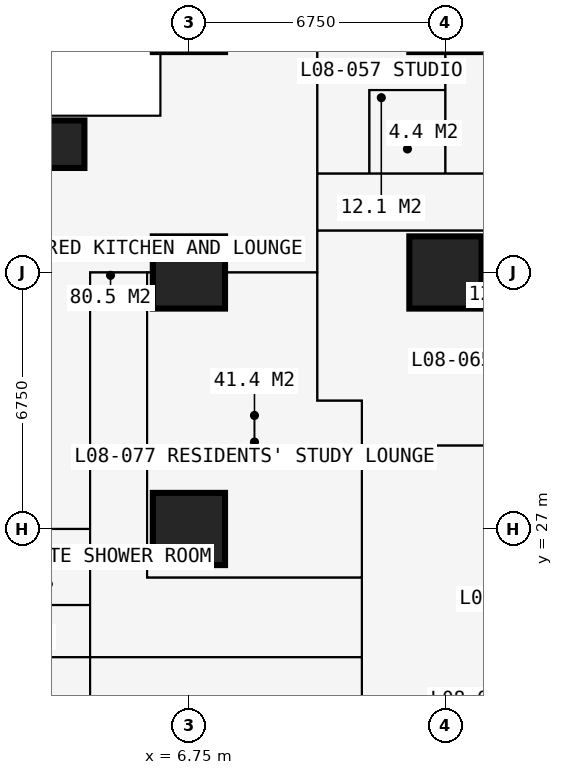
"""IFC4 building model, lengths in metres.
Left out: names, types, materials, properties, quantities, classifications, styles, units other than length and angle.
Written with IfcOpenShell. Run it as: python <this file> out.ifc"""

import sys

from ifc_helpers import new_model, si_unit, direction, frame, frame_2d, origin, origin_2d, place, context, subcontext, project, spatial, rectangle, extrude, element, fill, save


model = new_model("IFC4")
c1 = context("Model", 3, precision=1e-05, world=origin(), true_north=direction((0.0, 1.0)))
c2 = subcontext(c1, "Body", "Model", "MODEL_VIEW")
j1 = project(units=[si_unit("LENGTHUNIT", "METRE"), si_unit("PLANEANGLEUNIT", "RADIAN")], contexts=[c1])
p1 = place(None, origin())
s1 = spatial("IfcSite", under=j1, at=p1, CompositionType="ELEMENT")
p2 = place(p1, origin())
s2 = spatial("IfcBuilding", under=s1, at=p2, CompositionType="ELEMENT")
p3 = place(p2, frame((0.0, 0.0, 32.4)))
s3 = spatial("IfcBuildingStorey", under=s2, at=p3, CompositionType="ELEMENT", Elevation=32.4)
p4 = place(p3, frame((3.375, 37.125, 0.0), z_axis=(0.0, 0.0, 1.0), x_axis=(1.0, 0.0, 0.0)))
e1 = element("IfcColumn", 1, at=p4, inside=s3, PredefinedType="COLUMN", context=c2, shape_type="SweptSolid", body=[
    extrude(rectangle(XDim=1.25, YDim=1.25, at=origin_2d()), origin(), (0.0, 0.0, 1.0), 3.6),
])
for number, where, z_axis, x_axis in (
    (2, (6.75, 27.0, 0.0), (0.0, 0.0, 1.0), (1.0, 0.0, 0.0)),
    (3, (6.75, 33.75, 0.0), (0.0, 0.0, 1.0), (1.0, 0.0, 0.0)),
    (4, (13.5, 33.75, 0.0), (0.0, 0.0, 1.0), (1.0, 0.0, 0.0)),
):
    element("IfcColumn", number, at=place(p3, frame(where, z_axis=z_axis, x_axis=x_axis)), inside=s3, PredefinedType="COLUMN", context=c2, shape_type="SweptSolid", body=[
        extrude(rectangle(XDim=1.9, YDim=1.9, at=origin_2d()), origin(), (0.0, 0.0, 1.0), 3.6),
    ])
p5 = place(p3, frame((27.6, 27.0, 0.0), z_axis=(0.0, 0.0, 1.0), x_axis=(-1.0, 0.0, 0.0)))
e5 = element("IfcWall", 5, at=p5, inside=s3, PredefinedType="SHEAR", context=c2, shape_type="SweptSolid", body=[
    extrude(rectangle(XDim=14.7, YDim=1.2, at=frame_2d((7.35, 0.0))), origin(), (0.0, 0.0, 1.0), 3.6),
])
p6 = place(p5, frame((5.225, 0.0, 0.0)))
e6 = element("IfcOpeningElement", 6, at=p6, cuts=e5, PredefinedType="OPENING", context=c2, shape_type="SweptSolid", body=[
    extrude(rectangle(XDim=0.9, YDim=2.2, at=frame_2d((0.45, 1.1))), frame((0.0, 0.61, 0.0), z_axis=(0.0, -1.0, 0.0), x_axis=(1.0, 0.0, 0.0)), (0.0, 0.0, 1.0), 1.22),
])
p7 = place(p5, frame((8.2, 0.0, 0.0)))
e7 = element("IfcOpeningElement", 7, at=p7, cuts=e5, PredefinedType="OPENING", context=c2, shape_type="SweptSolid", body=[
    extrude(rectangle(XDim=1.0, YDim=2.2, at=frame_2d((0.5, 1.1))), frame((0.0, 0.61, 0.0), z_axis=(0.0, -1.0, 0.0), x_axis=(1.0, 0.0, 0.0)), (0.0, 0.0, 1.0), 1.22),
])
p8 = place(p3, frame((13.5, 26.4, 0.0), z_axis=(0.0, 0.0, 1.0), x_axis=(0.0, -1.0, 0.0)))
e8 = element("IfcWall", 8, at=p8, inside=s3, PredefinedType="SHEAR", context=c2, shape_type="SweptSolid", body=[
    extrude(rectangle(XDim=12.3, YDim=1.2, at=frame_2d((6.15, 0.0))), origin(), (0.0, 0.0, 1.0), 3.6),
])
p9 = place(p8, frame((7.45, 0.0, 0.0)))
e9 = element("IfcOpeningElement", 9, at=p9, cuts=e8, PredefinedType="OPENING", context=c2, shape_type="SweptSolid", body=[
    extrude(rectangle(XDim=1.2, YDim=2.2, at=frame_2d((0.6, 1.1))), frame((0.0, 0.61, 0.0), z_axis=(0.0, -1.0, 0.0), x_axis=(1.0, 0.0, 0.0)), (0.0, 0.0, 1.0), 1.22),
])
p10 = place(p3, frame((6.0, 41.25, 0.0), z_axis=(0.0, 0.0, 1.0), x_axis=(0.0, -1.0, 0.0)))
e10 = element("IfcWall", 10, at=p10, inside=s3, PredefinedType="SOLIDWALL", context=c2, shape_type="SweptSolid", body=[
    extrude(rectangle(XDim=3.375, YDim=0.3, at=frame_2d((1.688, 0.0))), origin(), (0.0, 0.0, 1.0), 3.375),
])
p11 = place(p10, frame((1.857, 0.0, 0.9)))
e11 = element("IfcOpeningElement", 11, at=p11, cuts=e10, PredefinedType="OPENING", context=c2, shape_type="SweptSolid", body=[
    extrude(rectangle(XDim=1.2, YDim=1.8, at=frame_2d((0.6, 0.9))), frame((0.0, 0.16, 0.0), z_axis=(0.0, -1.0, 0.0), x_axis=(1.0, 0.0, 0.0)), (0.0, 0.0, 1.0), 0.32),
])
p12 = place(p3, frame((6.0, 37.875, 0.0), z_axis=(0.0, 0.0, 1.0), x_axis=(-1.0, 0.0, 0.0)))
e12 = element("IfcWall", 12, at=p12, inside=s3, PredefinedType="SOLIDWALL", context=c2, shape_type="SweptSolid", body=[
    extrude(rectangle(XDim=3.375, YDim=0.3, at=frame_2d((1.688, 0.0))), origin(), (0.0, 0.0, 1.0), 3.375),
])
p13 = place(p12, frame((0.788, 0.0, 0.6)))
e13 = element("IfcOpeningElement", 13, at=p13, cuts=e12, PredefinedType="OPENING", context=c2, shape_type="SweptSolid", body=[
    extrude(rectangle(XDim=1.8, YDim=2.1, at=frame_2d((0.9, 1.05))), frame((0.0, 0.16, 0.0), z_axis=(0.0, -1.0, 0.0), x_axis=(1.0, 0.0, 0.0)), (0.0, 0.0, 1.0), 0.32),
])
p14 = place(p3, frame((-0.734, 23.625, 0.0), z_axis=(0.0, 0.0, 1.0), x_axis=(1.0, 0.0, 0.0)))
e14 = element("IfcWall", 14, at=p14, inside=s3, PredefinedType="PARTITIONING", context=c2, shape_type="SweptSolid", body=[
    extrude(rectangle(XDim=12.034, YDim=0.15, at=frame_2d((6.017, 0.0))), origin(), (0.0, 0.0, 1.0), 3.375),
])
p15 = place(p3, frame((-0.734, 27.0, 0.0), z_axis=(0.0, 0.0, 1.0), x_axis=(1.0, 0.0, 0.0)))
e15 = element("IfcWall", 15, at=p15, inside=s3, PredefinedType="PARTITIONING", context=c2, shape_type="SweptSolid", body=[
    extrude(rectangle(XDim=4.884, YDim=0.15, at=frame_2d((2.442, 0.0))), origin(), (0.0, 0.0, 1.0), 2.61),
])
p16 = place(p3, frame((1.95, 25.0, 0.0), z_axis=(0.0, 0.0, 1.0), x_axis=(1.0, 0.0, 0.0)))
e16 = element("IfcWall", 16, at=p16, inside=s3, PredefinedType="PARTITIONING", context=c2, shape_type="SweptSolid", body=[
    extrude(rectangle(XDim=2.2, YDim=0.1, at=frame_2d((1.1, 0.0))), origin(), (0.0, 0.0, 1.0), 3.375),
])
p17 = place(p16, frame((0.65, 0.0, 0.0)))
e17 = element("IfcOpeningElement", 17, at=p17, cuts=e16, PredefinedType="OPENING", context=c2, shape_type="SweptSolid", body=[
    extrude(rectangle(XDim=0.9, YDim=2.2, at=frame_2d((0.45, 1.1))), frame((0.0, 0.06, 0.0), z_axis=(0.0, -1.0, 0.0), x_axis=(1.0, 0.0, 0.0)), (0.0, 0.0, 1.0), 0.12),
])
p18 = place(p3, frame((4.15, 10.125, 0.0), z_axis=(0.0, 0.0, 1.0), x_axis=(0.0, 1.0, 0.0)))
e18 = element("IfcWall", 18, at=p18, inside=s3, PredefinedType="PARTITIONING", context=c2, shape_type="SweptSolid", body=[
    extrude(rectangle(XDim=23.625, YDim=0.15, at=frame_2d((11.812, 0.0))), origin(), (0.0, 0.0, 1.0), 3.375),
])
p19 = place(p18, frame((19.775, 0.0, 0.0)))
e19 = element("IfcOpeningElement", 19, at=p19, cuts=e18, PredefinedType="OPENING", context=c2, shape_type="SweptSolid", body=[
    extrude(rectangle(XDim=1.0, YDim=2.2, at=frame_2d((0.5, 1.1))), frame((0.0, 0.085, 0.0), z_axis=(0.0, -1.0, 0.0), x_axis=(1.0, 0.0, 0.0)), (0.0, 0.0, 1.0), 0.17),
])
p20 = place(p18, frame((13.7, 0.0, 0.0)))
e20 = element("IfcOpeningElement", 20, at=p20, cuts=e18, PredefinedType="OPENING", context=c2, shape_type="SweptSolid", body=[
    extrude(rectangle(XDim=0.95, YDim=2.2, at=frame_2d((0.475, 1.1))), frame((0.0, 0.085, 0.0), z_axis=(0.0, -1.0, 0.0), x_axis=(1.0, 0.0, 0.0)), (0.0, 0.0, 1.0), 0.17),
])
p21 = place(p18, frame((4.2, 0.0, 0.0)))
e21 = element("IfcOpeningElement", 21, at=p21, cuts=e18, PredefinedType="OPENING", context=c2, shape_type="SweptSolid", body=[
    extrude(rectangle(XDim=0.95, YDim=2.2, at=frame_2d((0.475, 1.1))), frame((0.0, 0.085, 0.0), z_axis=(0.0, -1.0, 0.0), x_axis=(1.0, 0.0, 0.0)), (0.0, 0.0, 1.0), 0.17),
])
p22 = place(p18, frame((10.95, 0.0, 0.0)))
e22 = element("IfcOpeningElement", 22, at=p22, cuts=e18, PredefinedType="OPENING", context=c2, shape_type="SweptSolid", body=[
    extrude(rectangle(XDim=0.95, YDim=2.2, at=frame_2d((0.475, 1.1))), frame((0.0, 0.085, 0.0), z_axis=(0.0, -1.0, 0.0), x_axis=(1.0, 0.0, 0.0)), (0.0, 0.0, 1.0), 0.17),
])
p23 = place(p3, frame((4.15, 33.75, 0.0), z_axis=(0.0, 0.0, 1.0), x_axis=(1.0, 0.0, 0.0)))
e23 = element("IfcWall", 23, at=p23, inside=s3, PredefinedType="PARTITIONING", context=c2, shape_type="SweptSolid", body=[
    extrude(rectangle(XDim=5.975, YDim=0.15, at=frame_2d((2.988, 0.0))), origin(), (0.0, 0.0, 1.0), 2.877),
])
p24 = place(p3, frame((5.65, 25.725, 0.0), z_axis=(0.0, 0.0, 1.0), x_axis=(0.0, 1.0, 0.0)))
e24 = element("IfcWall", 24, at=p24, inside=s3, PredefinedType="PARTITIONING", context=c2, shape_type="SweptSolid", body=[
    extrude(rectangle(XDim=8.025, YDim=0.15, at=frame_2d((4.012, 0.0))), origin(), (0.0, 0.0, 1.0), 3.375),
])
p25 = place(p3, frame((5.65, 25.725, 0.0), z_axis=(0.0, 0.0, 1.0), x_axis=(1.0, 0.0, 0.0)))
e25 = element("IfcWall", 25, at=p25, inside=s3, PredefinedType="PARTITIONING", context=c2, shape_type="SweptSolid", body=[
    extrude(rectangle(XDim=5.65, YDim=0.15, at=frame_2d((2.825, 0.0))), origin(), (0.0, 0.0, 1.0), 3.375),
])
p26 = place(p3, frame((10.125, 30.375, 0.0), z_axis=(0.0, 0.0, 1.0), x_axis=(0.0, 1.0, 0.0)))
e26 = element("IfcWall", 26, at=p26, inside=s3, PredefinedType="PARTITIONING", context=c2, shape_type="SweptSolid", body=[
    extrude(rectangle(XDim=10.859, YDim=0.15, at=frame_2d((5.429, 0.0))), origin(), (0.0, 0.0, 1.0), 3.375),
])
p27 = place(p3, frame((10.125, 30.375, 0.0), z_axis=(0.0, 0.0, 1.0), x_axis=(1.0, 0.0, 0.0)))
e27 = element("IfcWall", 27, at=p27, inside=s3, PredefinedType="PARTITIONING", context=c2, shape_type="SweptSolid", body=[
    extrude(rectangle(XDim=1.175, YDim=0.15, at=frame_2d((0.587, 0.0))), origin(), (0.0, 0.0, 1.0), 3.375),
])
p28 = place(p3, frame((10.125, 34.85, 0.0), z_axis=(0.0, 0.0, 1.0), x_axis=(1.0, 0.0, 0.0)))
e28 = element("IfcWall", 28, at=p28, inside=s3, PredefinedType="PARTITIONING", context=c2, shape_type="SweptSolid", body=[
    extrude(rectangle(XDim=10.762, YDim=0.15, at=frame_2d((5.381, 0.0))), origin(), (0.0, 0.0, 1.0), 3.375),
])
p29 = place(p28, frame((4.9, 0.0, 0.0)))
e29 = element("IfcOpeningElement", 29, at=p29, cuts=e28, PredefinedType="OPENING", context=c2, shape_type="SweptSolid", body=[
    extrude(rectangle(XDim=0.95, YDim=2.2, at=frame_2d((0.475, 1.1))), frame((0.0, 0.085, 0.0), z_axis=(0.0, -1.0, 0.0), x_axis=(1.0, 0.0, 0.0)), (0.0, 0.0, 1.0), 0.17),
])
p30 = place(p3, frame((10.125, 36.35, 0.0), z_axis=(0.0, 0.0, 1.0), x_axis=(1.0, 0.0, 0.0)))
e30 = element("IfcWall", 30, at=p30, inside=s3, PredefinedType="PARTITIONING", context=c2, shape_type="SweptSolid", body=[
    extrude(rectangle(XDim=23.625, YDim=0.1, at=frame_2d((11.812, 0.0))), origin(), (0.0, 0.0, 1.0), 3.375),
])
p31 = place(p30, frame((20.5, 0.0, 0.0)))
e31 = element("IfcOpeningElement", 31, at=p31, cuts=e30, PredefinedType="OPENING", context=c2, shape_type="SweptSolid", body=[
    extrude(rectangle(XDim=0.95, YDim=2.2, at=frame_2d((0.475, 1.1))), frame((0.0, 0.06, 0.0), z_axis=(0.0, -1.0, 0.0), x_axis=(1.0, 0.0, 0.0)), (0.0, 0.0, 1.0), 0.12),
])
p32 = place(p30, frame((17.125, 0.0, 0.0)))
e32 = element("IfcOpeningElement", 32, at=p32, cuts=e30, PredefinedType="OPENING", context=c2, shape_type="SweptSolid", body=[
    extrude(rectangle(XDim=0.95, YDim=2.2, at=frame_2d((0.475, 1.1))), frame((0.0, 0.06, 0.0), z_axis=(0.0, -1.0, 0.0), x_axis=(1.0, 0.0, 0.0)), (0.0, 0.0, 1.0), 0.12),
])
p33 = place(p30, frame((13.7, 0.0, 0.0)))
e33 = element("IfcOpeningElement", 33, at=p33, cuts=e30, PredefinedType="OPENING", context=c2, shape_type="SweptSolid", body=[
    extrude(rectangle(XDim=0.95, YDim=2.2, at=frame_2d((0.475, 1.1))), frame((0.0, 0.06, 0.0), z_axis=(0.0, -1.0, 0.0), x_axis=(1.0, 0.0, 0.0)), (0.0, 0.0, 1.0), 0.12),
])
p34 = place(p30, frame((0.2, 0.0, 0.0)))
e34 = element("IfcOpeningElement", 34, at=p34, cuts=e30, PredefinedType="OPENING", context=c2, shape_type="SweptSolid", body=[
    extrude(rectangle(XDim=0.95, YDim=2.2, at=frame_2d((0.475, 1.1))), frame((0.0, 0.06, 0.0), z_axis=(0.0, -1.0, 0.0), x_axis=(1.0, 0.0, 0.0)), (0.0, 0.0, 1.0), 0.12),
])
p35 = place(p30, frame((3.625, 0.0, 0.0)))
e35 = element("IfcOpeningElement", 35, at=p35, cuts=e30, PredefinedType="OPENING", context=c2, shape_type="SweptSolid", body=[
    extrude(rectangle(XDim=0.95, YDim=2.2, at=frame_2d((0.475, 1.1))), frame((0.0, 0.06, 0.0), z_axis=(0.0, -1.0, 0.0), x_axis=(1.0, 0.0, 0.0)), (0.0, 0.0, 1.0), 0.12),
])
p36 = place(p30, frame((7.0, 0.0, 0.0)))
e36 = element("IfcOpeningElement", 36, at=p36, cuts=e30, PredefinedType="OPENING", context=c2, shape_type="SweptSolid", body=[
    extrude(rectangle(XDim=0.95, YDim=2.2, at=frame_2d((0.475, 1.1))), frame((0.0, 0.06, 0.0), z_axis=(0.0, -1.0, 0.0), x_axis=(1.0, 0.0, 0.0)), (0.0, 0.0, 1.0), 0.12),
])
p37 = place(p30, frame((10.375, 0.0, 0.0)))
e37 = element("IfcOpeningElement", 37, at=p37, cuts=e30, PredefinedType="OPENING", context=c2, shape_type="SweptSolid", body=[
    extrude(rectangle(XDim=0.95, YDim=2.2, at=frame_2d((0.475, 1.1))), frame((0.0, 0.06, 0.0), z_axis=(0.0, -1.0, 0.0), x_axis=(1.0, 0.0, 0.0)), (0.0, 0.0, 1.0), 0.12),
])
p38 = place(p3, frame((11.3, 11.3, 0.0), z_axis=(0.0, 0.0, 1.0), x_axis=(0.0, 1.0, 0.0)))
e38 = element("IfcWall", 38, at=p38, inside=s3, PredefinedType="PARTITIONING", context=c2, shape_type="SweptSolid", body=[
    extrude(rectangle(XDim=19.075, YDim=0.15, at=frame_2d((9.538, 0.0))), origin(), (0.0, 0.0, 1.0), 3.375),
])
p39 = place(p38, frame((12.875, 0.0, 0.0)))
e39 = element("IfcOpeningElement", 39, at=p39, cuts=e38, PredefinedType="OPENING", context=c2, shape_type="SweptSolid", body=[
    extrude(rectangle(XDim=1.0, YDim=2.2, at=frame_2d((0.5, 1.1))), frame((0.0, 0.085, 0.0), z_axis=(0.0, -1.0, 0.0), x_axis=(1.0, 0.0, 0.0)), (0.0, 0.0, 1.0), 0.17),
])
p40 = place(p38, frame((10.438, 0.0, 0.0)))
e40 = element("IfcOpeningElement", 40, at=p40, cuts=e38, PredefinedType="OPENING", context=c2, shape_type="SweptSolid", body=[
    extrude(rectangle(XDim=1.0, YDim=2.2, at=frame_2d((0.5, 1.1))), frame((0.0, 0.085, 0.0), z_axis=(0.0, -1.0, 0.0), x_axis=(1.0, 0.0, 0.0)), (0.0, 0.0, 1.0), 0.17),
])
p41 = place(p38, frame((15.675, 0.0, 0.0)))
e41 = element("IfcOpeningElement", 41, at=p41, cuts=e38, PredefinedType="OPENING", context=c2, shape_type="SweptSolid", body=[
    extrude(rectangle(XDim=0.95, YDim=2.2, at=frame_2d((0.475, 1.1))), frame((0.0, 0.085, 0.0), z_axis=(0.0, -1.0, 0.0), x_axis=(1.0, 0.0, 0.0)), (0.0, 0.0, 1.0), 0.17),
])
p42 = place(p3, frame((11.3, 29.2, 0.0), z_axis=(0.0, 0.0, 1.0), x_axis=(1.0, 0.0, 0.0)))
e42 = element("IfcWall", 42, at=p42, inside=s3, PredefinedType="PARTITIONING", context=c2, shape_type="SweptSolid", body=[
    extrude(rectangle(XDim=19.075, YDim=0.15, at=frame_2d((9.538, 0.0))), origin(), (0.0, 0.0, 1.0), 3.375),
])
p43 = place(p42, frame((12.875, 0.0, 0.0)))
e43 = element("IfcOpeningElement", 43, at=p43, cuts=e42, PredefinedType="OPENING", context=c2, shape_type="SweptSolid", body=[
    extrude(rectangle(XDim=1.0, YDim=2.2, at=frame_2d((0.5, 1.1))), frame((0.0, 0.085, 0.0), z_axis=(0.0, -1.0, 0.0), x_axis=(1.0, 0.0, 0.0)), (0.0, 0.0, 1.0), 0.17),
])
p44 = place(p42, frame((10.438, 0.0, 0.0)))
e44 = element("IfcOpeningElement", 44, at=p44, cuts=e42, PredefinedType="OPENING", context=c2, shape_type="SweptSolid", body=[
    extrude(rectangle(XDim=1.0, YDim=2.2, at=frame_2d((0.5, 1.1))), frame((0.0, 0.085, 0.0), z_axis=(0.0, -1.0, 0.0), x_axis=(1.0, 0.0, 0.0)), (0.0, 0.0, 1.0), 0.17),
])
p45 = place(p42, frame((15.675, 0.0, 0.0)))
e45 = element("IfcOpeningElement", 45, at=p45, cuts=e42, PredefinedType="OPENING", context=c2, shape_type="SweptSolid", body=[
    extrude(rectangle(XDim=0.95, YDim=2.2, at=frame_2d((0.475, 1.1))), frame((0.0, 0.085, 0.0), z_axis=(0.0, -1.0, 0.0), x_axis=(1.0, 0.0, 0.0)), (0.0, 0.0, 1.0), 0.17),
])
p46 = place(p3, frame((11.5, 36.35, 0.0), z_axis=(0.0, 0.0, 1.0), x_axis=(0.0, 1.0, 0.0)))
e46 = element("IfcWall", 46, at=p46, inside=s3, PredefinedType="PARTITIONING", context=c2, shape_type="SweptSolid", body=[
    extrude(rectangle(XDim=2.2, YDim=0.1, at=frame_2d((1.1, 0.0))), origin(), (0.0, 0.0, 1.0), 3.375),
])
p47 = place(p46, frame((0.65, 0.0, 0.0)))
e47 = element("IfcOpeningElement", 47, at=p47, cuts=e46, PredefinedType="OPENING", context=c2, shape_type="SweptSolid", body=[
    extrude(rectangle(XDim=0.9, YDim=2.2, at=frame_2d((0.45, 1.1))), frame((0.0, 0.06, 0.0), z_axis=(0.0, -1.0, 0.0), x_axis=(1.0, 0.0, 0.0)), (0.0, 0.0, 1.0), 0.12),
])
p48 = place(p3, frame((11.5, 38.55, 0.0), z_axis=(0.0, 0.0, 1.0), x_axis=(1.0, 0.0, 0.0)))
e48 = element("IfcWall", 48, at=p48, inside=s3, PredefinedType="PARTITIONING", context=c2, shape_type="SweptSolid", body=[
    extrude(rectangle(XDim=2.0, YDim=0.1, at=frame_2d((1.0, 0.0))), origin(), (0.0, 0.0, 1.0), 3.375),
])
p49 = place(p3, frame((13.5, 36.35, 0.0), z_axis=(0.0, 0.0, 1.0), x_axis=(0.0, 1.0, 0.0)))
e49 = element("IfcWall", 49, at=p49, inside=s3, PredefinedType="PARTITIONING", context=c2, shape_type="SweptSolid", body=[
    extrude(rectangle(XDim=4.884, YDim=0.175, at=frame_2d((2.442, 0.0))), origin(), (0.0, 0.0, 1.0), 2.877),
])
p50 = place(p11, origin())
e50 = element("IfcWindow", 50, at=p50, inside=s3, PartitioningType="SINGLE_PANEL", PredefinedType="WINDOW", context=c2, shape_type="SweptSolid", body=[
    extrude(rectangle(XDim=1.2, YDim=1.8, at=frame_2d((0.6, 0.9))), frame((0.0, 0.03, 0.0), z_axis=(0.0, -1.0, 0.0), x_axis=(1.0, 0.0, 0.0)), (0.0, 0.0, 1.0), 0.06),
])
fill(e11, e50)
p51 = place(p13, origin())
e51 = element("IfcWindow", 51, at=p51, inside=s3, PartitioningType="SINGLE_PANEL", PredefinedType="WINDOW", context=c2, shape_type="SweptSolid", body=[
    extrude(rectangle(XDim=1.8, YDim=2.1, at=frame_2d((0.9, 1.05))), frame((0.0, 0.03, 0.0), z_axis=(0.0, -1.0, 0.0), x_axis=(1.0, 0.0, 0.0)), (0.0, 0.0, 1.0), 0.06),
])
fill(e13, e51)
p52 = place(p34, origin())
e52 = element("IfcDoor", 52, at=p52, inside=s3, OperationType="SINGLE_SWING_LEFT", PredefinedType="DOOR", context=c2, shape_type="SweptSolid", body=[
    extrude(rectangle(XDim=0.95, YDim=2.2, at=frame_2d((0.475, 1.1))), frame((0.0, 0.025, 0.0), z_axis=(0.0, -1.0, 0.0), x_axis=(1.0, 0.0, 0.0)), (0.0, 0.0, 1.0), 0.05),
])
fill(e34, e52)
p53 = place(p47, origin())
e53 = element("IfcDoor", 53, at=p53, inside=s3, OperationType="SINGLE_SWING_RIGHT", PredefinedType="DOOR", context=c2, shape_type="SweptSolid", body=[
    extrude(rectangle(XDim=0.9, YDim=2.2, at=frame_2d((0.45, 1.1))), frame((0.0, 0.025, 0.0), z_axis=(0.0, -1.0, 0.0), x_axis=(1.0, 0.0, 0.0)), (0.0, 0.0, 1.0), 0.05),
])
fill(e47, e53)
p54 = place(p35, origin())
e54 = element("IfcDoor", 54, at=p54, inside=s3, OperationType="SINGLE_SWING_LEFT", PredefinedType="DOOR", context=c2, shape_type="SweptSolid", body=[
    extrude(rectangle(XDim=0.95, YDim=2.2, at=frame_2d((0.475, 1.1))), frame((0.0, 0.025, 0.0), z_axis=(0.0, -1.0, 0.0), x_axis=(1.0, 0.0, 0.0)), (0.0, 0.0, 1.0), 0.05),
])
fill(e35, e54)
p55 = place(p19, origin())
e55 = element("IfcDoor", 55, at=p55, inside=s3, OperationType="SINGLE_SWING_LEFT", PredefinedType="DOOR", context=c2, shape_type="SweptSolid", body=[
    extrude(rectangle(XDim=1.0, YDim=2.2, at=frame_2d((0.5, 1.1))), frame((0.0, 0.025, 0.0), z_axis=(0.0, -1.0, 0.0), x_axis=(1.0, 0.0, 0.0)), (0.0, 0.0, 1.0), 0.05),
])
fill(e19, e55)
p56 = place(p20, origin())
e56 = element("IfcDoor", 56, at=p56, inside=s3, OperationType="SINGLE_SWING_LEFT", PredefinedType="DOOR", context=c2, shape_type="SweptSolid", body=[
    extrude(rectangle(XDim=0.95, YDim=2.2, at=frame_2d((0.475, 1.1))), frame((0.0, 0.025, 0.0), z_axis=(0.0, -1.0, 0.0), x_axis=(1.0, 0.0, 0.0)), (0.0, 0.0, 1.0), 0.05),
])
fill(e20, e56)
p57 = place(p17, origin())
e57 = element("IfcDoor", 57, at=p57, inside=s3, OperationType="SINGLE_SWING_RIGHT", PredefinedType="DOOR", context=c2, shape_type="SweptSolid", body=[
    extrude(rectangle(XDim=0.9, YDim=2.2, at=frame_2d((0.45, 1.1))), frame((0.0, 0.025, 0.0), z_axis=(0.0, -1.0, 0.0), x_axis=(1.0, 0.0, 0.0)), (0.0, 0.0, 1.0), 0.05),
])
fill(e17, e57)
p58 = place(p39, origin())
e58 = element("IfcDoor", 58, at=p58, inside=s3, OperationType="SINGLE_SWING_LEFT", PredefinedType="DOOR", context=c2, shape_type="SweptSolid", body=[
    extrude(rectangle(XDim=1.0, YDim=2.2, at=frame_2d((0.5, 1.1))), frame((0.0, 0.025, 0.0), z_axis=(0.0, -1.0, 0.0), x_axis=(1.0, 0.0, 0.0)), (0.0, 0.0, 1.0), 0.05),
])
fill(e39, e58)
p59 = place(p40, origin())
e59 = element("IfcDoor", 59, at=p59, inside=s3, OperationType="SINGLE_SWING_LEFT", PredefinedType="DOOR", context=c2, shape_type="SweptSolid", body=[
    extrude(rectangle(XDim=1.0, YDim=2.2, at=frame_2d((0.5, 1.1))), frame((0.0, 0.025, 0.0), z_axis=(0.0, -1.0, 0.0), x_axis=(1.0, 0.0, 0.0)), (0.0, 0.0, 1.0), 0.05),
])
fill(e40, e59)
p60 = place(p41, origin())
e60 = element("IfcDoor", 60, at=p60, inside=s3, OperationType="SINGLE_SWING_LEFT", PredefinedType="DOOR", context=c2, shape_type="SweptSolid", body=[
    extrude(rectangle(XDim=0.95, YDim=2.2, at=frame_2d((0.475, 1.1))), frame((0.0, 0.025, 0.0), z_axis=(0.0, -1.0, 0.0), x_axis=(1.0, 0.0, 0.0)), (0.0, 0.0, 1.0), 0.05),
])
fill(e41, e60)
save(model, sys.argv[1])
